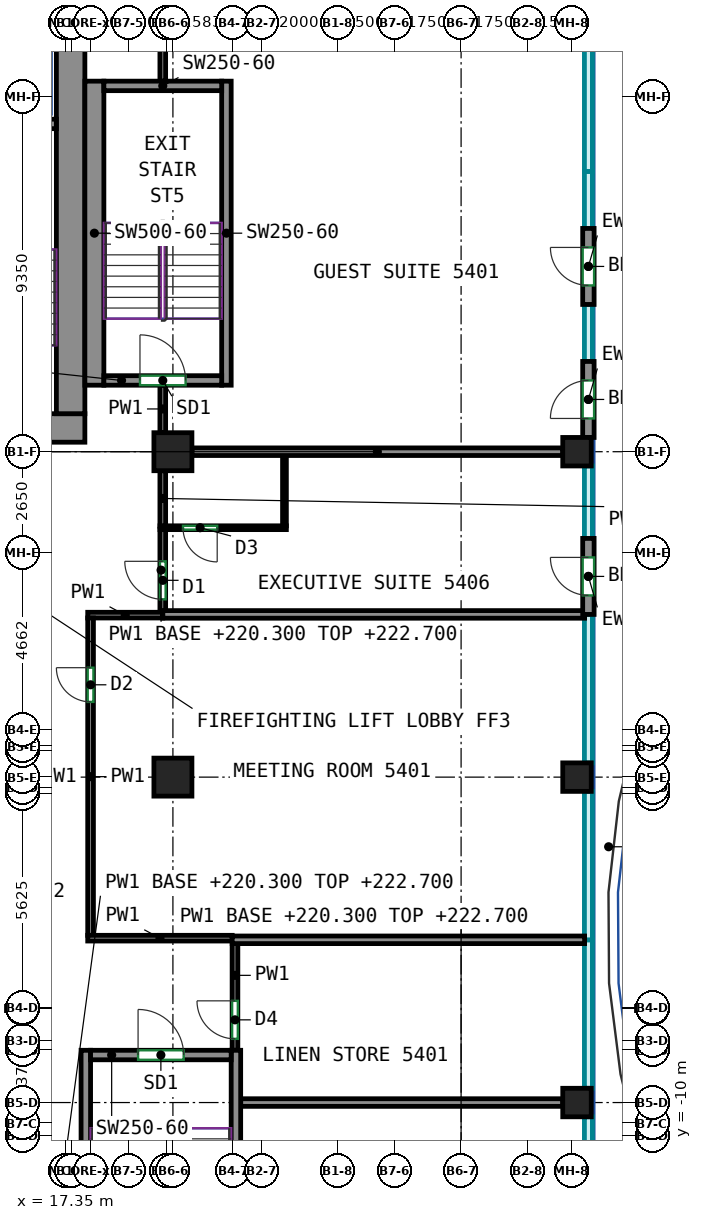
"""IFC4 building model, lengths in metres.
Left out: names, types, materials, properties, quantities, classifications, styles, units other than length and angle.
Written with IfcOpenShell. Run it as: python <this file> out.ifc"""

import sys

from ifc_helpers import new_model, si_unit, direction, frame, frame_2d, origin, origin_2d, place, context, subcontext, project, spatial, rectangle, extrude, source, transform, mapped, element, fill, save


model = new_model("IFC4")
c1 = context("Model", 3, precision=1e-05, world=origin(), true_north=direction((0.0, 1.0)))
c2 = subcontext(c1, "Body", "Model", "MODEL_VIEW")
j1 = project(units=[si_unit("LENGTHUNIT", "METRE"), si_unit("PLANEANGLEUNIT", "RADIAN")], contexts=[c1])
p1 = place(None, origin())
s1 = spatial("IfcSite", under=j1, at=p1, CompositionType="ELEMENT")
p2 = place(p1, origin())
s2 = spatial("IfcBuilding", under=s1, at=p2, CompositionType="ELEMENT")
p3 = place(p2, frame((0.0, 0.0, 220.3)))
s3 = spatial("IfcBuildingStorey", under=s2, at=p3, CompositionType="ELEMENT", Elevation=220.3)
m1 = source(origin(), c2, "Body", "SweptSolid", [
    extrude(rectangle(XDim=1.0, YDim=1.0, at=origin_2d()), origin(), (0.0, 0.0, 1.0), 3.0),
])
for number, where, z_axis, x_axis in (
    (1, (20.167, -0.562, 0.0), (0.0, 0.0, 1.0), (1.0, 0.0, 0.0)),
    (2, (20.167, 8.0, 0.0), (0.0, 0.0, 1.0), (1.0, 0.0, 0.0)),
):
    element("IfcColumn", number, at=place(p3, frame(where, z_axis=z_axis, x_axis=x_axis)), inside=s3, PredefinedType="COLUMN", context=c2, shape_type="MappedRepresentation", body=[
        mapped(m1, transform((0.0, 0.0, 0.0))),
    ])
m2 = source(origin(), c2, "Body", "SweptSolid", [
    extrude(rectangle(XDim=0.75, YDim=0.75, at=origin_2d()), origin(), (0.0, 0.0, 1.0), 3.0),
])
for number, where, z_axis, x_axis in (
    (3, (30.8, -9.125, 0.0), (0.0, 0.0, 1.0), (1.0, 0.0, 0.0)),
    (4, (30.8, -0.562, 0.0), (0.0, 0.0, 1.0), (1.0, 0.0, 0.0)),
    (5, (30.8, 8.0, 0.0), (0.0, 0.0, 1.0), (1.0, 0.0, 0.0)),
):
    element("IfcColumn", number, at=place(p3, frame(where, z_axis=z_axis, x_axis=x_axis)), inside=s3, PredefinedType="COLUMN", context=c2, shape_type="MappedRepresentation", body=[
        mapped(m2, transform((0.0, 0.0, 0.0))),
    ])
m3 = source(origin(), c2, "Body", "SweptSolid", [
    extrude(rectangle(XDim=5.38, YDim=0.75, at=frame_2d((2.69, 0.0))), origin(), (0.0, 0.0, 1.0), 3.0),
])
p4 = place(p3, frame((12.47, 8.625, 0.0), z_axis=(0.0, 0.0, 1.0), x_axis=(1.0, 0.0, 0.0)))
e6 = element("IfcWall", 6, at=p4, inside=s3, PredefinedType="SHEAR", context=c2, shape_type="MappedRepresentation", body=[
    mapped(m3, transform((0.0, 0.0, 0.0))),
])
p5 = place(p4, frame((2.18, 0.0, 0.0)))
e7 = element("IfcOpeningElement", 7, at=p5, cuts=e6, PredefinedType="OPENING", context=c2, shape_type="SweptSolid", body=[
    extrude(rectangle(XDim=1.2, YDim=2.1, at=frame_2d((0.6, 1.05))), frame((0.0, 0.385, 0.0), z_axis=(0.0, -1.0, 0.0), x_axis=(1.0, 0.0, 0.0)), (0.0, 0.0, 1.0), 0.77),
])
m4 = source(origin(), c2, "Body", "SweptSolid", [
    extrude(rectangle(XDim=12.0, YDim=0.75, at=frame_2d((6.0, 0.0))), origin(), (0.0, 0.0, 1.0), 3.0),
])
p6 = place(p3, frame((17.475, 9.0, 0.0), z_axis=(0.0, 0.0, 1.0), x_axis=(0.0, 1.0, 0.0)))
e8 = element("IfcWall", 8, at=p6, inside=s3, PredefinedType="SHEAR", context=c2, shape_type="MappedRepresentation", body=[
    mapped(m4, transform((0.0, 0.0, 0.0))),
])
m5 = source(origin(), c2, "Body", "SweptSolid", [
    extrude(rectangle(XDim=3.7, YDim=0.25, at=frame_2d((1.85, 0.0))), origin(), (0.0, 0.0, 1.0), 3.0),
])
p7 = place(p3, frame((13.4, 16.625, 0.0), z_axis=(0.0, 0.0, 1.0), x_axis=(1.0, 0.0, 0.0)))
e9 = element("IfcWall", 9, at=p7, inside=s3, PredefinedType="SHEAR", context=c2, shape_type="MappedRepresentation", body=[
    mapped(m5, transform((0.0, 0.0, 0.0))),
])
m6 = source(origin(), c2, "Body", "SweptSolid", [
    extrude(rectangle(XDim=8.0, YDim=0.25, at=frame_2d((4.0, 0.0))), origin(), (0.0, 0.0, 1.0), 3.0),
])
for number, where, z_axis, x_axis in (
    (10, (17.875, -15.75, 0.0), (0.0, 0.0, 1.0), (0.0, 1.0, 0.0)),
    (11, (21.825, -15.75, 0.0), (0.0, 0.0, 1.0), (0.0, 1.0, 0.0)),
):
    element("IfcWall", number, at=place(p3, frame(where, z_axis=z_axis, x_axis=x_axis)), inside=s3, PredefinedType="SHEAR", context=c2, shape_type="MappedRepresentation", body=[
        mapped(m6, transform((0.0, 0.0, 0.0))),
    ])
m7 = source(origin(), c2, "Body", "SweptSolid", [
    extrude(rectangle(XDim=3.7, YDim=0.25, at=frame_2d((1.85, 0.0))), origin(), (0.0, 0.0, 1.0), 3.0),
])
p8 = place(p3, frame((18.0, -7.875, 0.0), z_axis=(0.0, 0.0, 1.0), x_axis=(1.0, 0.0, 0.0)))
e12 = element("IfcWall", 12, at=p8, inside=s3, PredefinedType="SHEAR", context=c2, shape_type="MappedRepresentation", body=[
    mapped(m7, transform((0.0, 0.0, 0.0))),
])
p9 = place(p8, frame((1.25, 0.0, 0.0)))
e13 = element("IfcOpeningElement", 13, at=p9, cuts=e12, PredefinedType="OPENING", context=c2, shape_type="SweptSolid", body=[
    extrude(rectangle(XDim=1.2, YDim=2.1, at=frame_2d((0.6, 1.05))), frame((0.0, 0.135, 0.0), z_axis=(0.0, -1.0, 0.0), x_axis=(1.0, 0.0, 0.0)), (0.0, 0.0, 1.0), 0.27),
])
m8 = source(origin(), c2, "Body", "SweptSolid", [
    extrude(rectangle(XDim=8.0, YDim=0.5, at=frame_2d((4.0, 0.0))), origin(), (0.0, 0.0, 1.0), 3.0),
])
p10 = place(p3, frame((18.1, 9.75, 0.0), z_axis=(0.0, 0.0, 1.0), x_axis=(0.0, 1.0, 0.0)))
e14 = element("IfcWall", 14, at=p10, inside=s3, PredefinedType="SHEAR", context=c2, shape_type="MappedRepresentation", body=[
    mapped(m8, transform((0.0, 0.0, 0.0))),
])
p11 = place(p3, frame((21.575, 9.75, 0.0), z_axis=(0.0, 0.0, 1.0), x_axis=(0.0, 1.0, 0.0)))
e15 = element("IfcWall", 15, at=p11, inside=s3, PredefinedType="SHEAR", context=c2, shape_type="MappedRepresentation", body=[
    mapped(m6, transform((0.0, 0.0, 0.0))),
])
m9 = source(origin(), c2, "Body", "SweptSolid", [
    extrude(rectangle(XDim=3.1, YDim=0.25, at=frame_2d((1.55, 0.0))), origin(), (0.0, 0.0, 1.0), 3.0),
])
p12 = place(p3, frame((18.35, 9.875, 0.0), z_axis=(0.0, 0.0, 1.0), x_axis=(1.0, 0.0, 0.0)))
e16 = element("IfcWall", 16, at=p12, inside=s3, PredefinedType="SHEAR", context=c2, shape_type="MappedRepresentation", body=[
    mapped(m9, transform((0.0, 0.0, 0.0))),
])
p13 = place(p12, frame((0.95, 0.0, 0.0)))
e17 = element("IfcOpeningElement", 17, at=p13, cuts=e16, PredefinedType="OPENING", context=c2, shape_type="SweptSolid", body=[
    extrude(rectangle(XDim=1.2, YDim=2.1, at=frame_2d((0.6, 1.05))), frame((0.0, 0.135, 0.0), z_axis=(0.0, -1.0, 0.0), x_axis=(1.0, 0.0, 0.0)), (0.0, 0.0, 1.0), 0.27),
])
p14 = place(p3, frame((18.35, 17.625, 0.0), z_axis=(0.0, 0.0, 1.0), x_axis=(1.0, 0.0, 0.0)))
e18 = element("IfcWall", 18, at=p14, inside=s3, PredefinedType="SHEAR", context=c2, shape_type="MappedRepresentation", body=[
    mapped(m9, transform((0.0, 0.0, 0.0))),
])
m10 = source(origin(), c2, "Body", "SweptSolid", [
    extrude(rectangle(XDim=2.0, YDim=0.3, at=frame_2d((1.0, 0.0))), origin(), (0.0, 0.0, 1.0), 3.0),
])
p15 = place(p3, frame((31.1, 3.719, 0.0), z_axis=(0.0, 0.0, 1.0), x_axis=(0.0, 1.0, 0.0)))
e19 = element("IfcWall", 19, at=p15, inside=s3, PredefinedType="SOLIDWALL", context=c2, shape_type="MappedRepresentation", body=[
    mapped(m10, transform((0.0, 0.0, 0.0))),
])
p16 = place(p15, frame((0.5, 0.0, 0.0)))
e20 = element("IfcOpeningElement", 20, at=p16, cuts=e19, PredefinedType="OPENING", context=c2, shape_type="SweptSolid", body=[
    extrude(rectangle(XDim=1.0, YDim=2.1, at=frame_2d((0.5, 1.05))), frame((0.0, 0.16, 0.0), z_axis=(0.0, -1.0, 0.0), x_axis=(1.0, 0.0, 0.0)), (0.0, 0.0, 1.0), 0.32),
])
p17 = place(p3, frame((31.1, 8.375, 0.0), z_axis=(0.0, 0.0, 1.0), x_axis=(0.0, 1.0, 0.0)))
e21 = element("IfcWall", 21, at=p17, inside=s3, PredefinedType="SOLIDWALL", context=c2, shape_type="MappedRepresentation", body=[
    mapped(m10, transform((0.0, 0.0, 0.0))),
])
p18 = place(p17, frame((0.5, 0.0, 0.0)))
e22 = element("IfcOpeningElement", 22, at=p18, cuts=e21, PredefinedType="OPENING", context=c2, shape_type="SweptSolid", body=[
    extrude(rectangle(XDim=1.0, YDim=2.1, at=frame_2d((0.5, 1.05))), frame((0.0, 0.16, 0.0), z_axis=(0.0, -1.0, 0.0), x_axis=(1.0, 0.0, 0.0)), (0.0, 0.0, 1.0), 0.32),
])
p19 = place(p3, frame((31.1, 11.875, 0.0), z_axis=(0.0, 0.0, 1.0), x_axis=(0.0, 1.0, 0.0)))
e23 = element("IfcWall", 23, at=p19, inside=s3, PredefinedType="SOLIDWALL", context=c2, shape_type="MappedRepresentation", body=[
    mapped(m10, transform((0.0, 0.0, 0.0))),
])
p20 = place(p19, frame((0.5, 0.0, 0.0)))
e24 = element("IfcOpeningElement", 24, at=p20, cuts=e23, PredefinedType="OPENING", context=c2, shape_type="SweptSolid", body=[
    extrude(rectangle(XDim=1.0, YDim=2.1, at=frame_2d((0.5, 1.05))), frame((0.0, 0.16, 0.0), z_axis=(0.0, -1.0, 0.0), x_axis=(1.0, 0.0, 0.0)), (0.0, 0.0, 1.0), 0.32),
])
p21 = place(p3, frame((19.9, 3.809, 0.0), z_axis=(0.0, 0.0, 1.0), x_axis=(0.0, 1.0, 0.0)))
e25 = element("IfcWall", 25, at=p21, inside=s3, PredefinedType="PARTITIONING", context=c2, shape_type="SweptSolid", body=[
    extrude(rectangle(XDim=2.151, YDim=0.15, at=frame_2d((1.075, 0.0))), origin(), (0.0, 0.0, 1.0), 2.4),
])
p22 = place(p21, frame((0.307, 0.0, 0.0)))
e26 = element("IfcOpeningElement", 26, at=p22, cuts=e25, PredefinedType="OPENING", context=c2, shape_type="SweptSolid", body=[
    extrude(rectangle(XDim=1.0, YDim=2.1, at=frame_2d((0.5, 1.05))), frame((0.0, 0.085, 0.0), z_axis=(0.0, -1.0, 0.0), x_axis=(1.0, 0.0, 0.0)), (0.0, 0.0, 1.0), 0.17),
])
p23 = place(p3, frame((19.9, 6.04, 0.0), z_axis=(0.0, 0.0, 1.0), x_axis=(0.0, 1.0, 0.0)))
e27 = element("IfcWall", 27, at=p23, inside=s3, PredefinedType="PARTITIONING", context=c2, shape_type="SweptSolid", body=[
    extrude(rectangle(XDim=1.46, YDim=0.15, at=frame_2d((0.73, 0.0))), origin(), (0.0, 0.0, 1.0), 2.4),
])
p24 = place(p3, frame((19.9, 17.75, 0.0), z_axis=(0.0, 0.0, 1.0), x_axis=(0.0, 1.0, 0.0)))
e28 = element("IfcWall", 28, at=p24, inside=s3, PredefinedType="PARTITIONING", context=c2, shape_type="SweptSolid", body=[
    extrude(rectangle(XDim=2.21, YDim=0.15, at=frame_2d((1.105, 0.0))), origin(), (0.0, 0.0, 1.0), 3.0),
])
p25 = place(p3, frame((19.9, 8.5, 0.0), z_axis=(0.0, 0.0, 1.0), x_axis=(0.0, 1.0, 0.0)))
e29 = element("IfcWall", 29, at=p25, inside=s3, PredefinedType="PARTITIONING", context=c2, shape_type="SweptSolid", body=[
    extrude(rectangle(XDim=1.25, YDim=0.15, at=frame_2d((0.625, 0.0))), origin(), (0.0, 0.0, 1.0), 3.0),
])
p26 = place(p3, frame((17.925, 3.7, 0.0), z_axis=(0.0, 0.0, 1.0), x_axis=(1.0, 0.0, 0.0)))
e30 = element("IfcWall", 30, at=p26, inside=s3, PredefinedType="PARTITIONING", context=c2, shape_type="SweptSolid", body=[
    extrude(rectangle(XDim=1.975, YDim=0.15, at=frame_2d((0.987, 0.0))), origin(), (0.0, 0.0, 1.0), 3.0),
])
p27 = place(p3, frame((18.0, -4.725, 0.0), z_axis=(0.0, 0.0, 1.0), x_axis=(0.0, 1.0, 0.0)))
e31 = element("IfcWall", 31, at=p27, inside=s3, PredefinedType="PARTITIONING", context=c2, shape_type="SweptSolid", body=[
    extrude(rectangle(XDim=8.35, YDim=0.15, at=frame_2d((4.175, 0.0))), origin(), (0.0, 0.0, 1.0), 3.0),
])
p28 = place(p27, frame((6.142, 0.0, 0.0)))
e32 = element("IfcOpeningElement", 32, at=p28, cuts=e31, PredefinedType="OPENING", context=c2, shape_type="SweptSolid", body=[
    extrude(rectangle(XDim=0.9, YDim=2.1, at=frame_2d((0.45, 1.05))), frame((0.0, 0.085, 0.0), z_axis=(0.0, -1.0, 0.0), x_axis=(1.0, 0.0, 0.0)), (0.0, 0.0, 1.0), 0.17),
])
p29 = place(p3, frame((17.925, -4.8, 0.0), z_axis=(0.0, 0.0, 1.0), x_axis=(1.0, 0.0, 0.0)))
e33 = element("IfcWall", 33, at=p29, inside=s3, PredefinedType="PARTITIONING", context=c2, shape_type="SweptSolid", body=[
    extrude(rectangle(XDim=3.802, YDim=0.15, at=frame_2d((1.901, 0.0))), origin(), (0.0, 0.0, 1.0), 3.0),
])
p30 = place(p3, frame((21.8, -7.75, 0.0), z_axis=(0.0, 0.0, 1.0), x_axis=(0.0, 1.0, 0.0)))
e34 = element("IfcWall", 34, at=p30, inside=s3, PredefinedType="PARTITIONING", context=c2, shape_type="SweptSolid", body=[
    extrude(rectangle(XDim=2.817, YDim=0.15, at=frame_2d((1.408, 0.0))), origin(), (0.0, 0.0, 1.0), 3.0),
])
p31 = place(p30, frame((0.301, 0.0, 0.0)))
e35 = element("IfcOpeningElement", 35, at=p31, cuts=e34, PredefinedType="OPENING", context=c2, shape_type="SweptSolid", body=[
    extrude(rectangle(XDim=1.0, YDim=2.1, at=frame_2d((0.5, 1.05))), frame((0.0, 0.085, 0.0), z_axis=(0.0, -1.0, 0.0), x_axis=(1.0, 0.0, 0.0)), (0.0, 0.0, 1.0), 0.17),
])
p32 = place(p3, frame((23.152, 6.0, 0.0), z_axis=(0.0, 0.0, 1.0), x_axis=(-1.0, 0.0, 0.0)))
e36 = element("IfcWall", 36, at=p32, inside=s3, PredefinedType="PARTITIONING", context=c2, shape_type="SweptSolid", body=[
    extrude(rectangle(XDim=3.325, YDim=0.1, at=frame_2d((1.663, 0.0))), origin(), (0.0, 0.0, 1.0), 3.0),
])
p33 = place(p32, frame((1.82, 0.0, 0.0)))
e37 = element("IfcOpeningElement", 37, at=p33, cuts=e36, PredefinedType="OPENING", context=c2, shape_type="SweptSolid", body=[
    extrude(rectangle(XDim=0.9, YDim=2.1, at=frame_2d((0.45, 1.05))), frame((0.0, 0.06, 0.0), z_axis=(0.0, -1.0, 0.0), x_axis=(1.0, 0.0, 0.0)), (0.0, 0.0, 1.0), 0.12),
])
p34 = place(p3, frame((23.102, 6.05, 0.0), z_axis=(0.0, 0.0, 1.0), x_axis=(0.0, 1.0, 0.0)))
e38 = element("IfcWall", 38, at=p34, inside=s3, PredefinedType="PARTITIONING", context=c2, shape_type="SweptSolid", body=[
    extrude(rectangle(XDim=1.85, YDim=0.1, at=frame_2d((0.925, 0.0))), origin(), (0.0, 0.0, 1.0), 3.0),
])
p35 = place(p3, frame((19.902, 3.719, 0.0), z_axis=(0.0, 0.0, 1.0), x_axis=(1.0, 0.0, 0.0)))
e39 = element("IfcWall", 39, at=p35, inside=s3, PredefinedType="PARTITIONING", context=c2, shape_type="SweptSolid", body=[
    extrude(rectangle(XDim=11.098, YDim=0.2, at=frame_2d((5.549, 0.0))), origin(), (0.0, 0.0, 1.0), 3.0),
])
p36 = place(p3, frame((20.667, 8.0, 0.0), z_axis=(0.0, 0.0, 1.0), x_axis=(1.0, 0.0, 0.0)))
e40 = element("IfcWall", 40, at=p36, inside=s3, PredefinedType="PARTITIONING", context=c2, shape_type="SweptSolid", body=[
    extrude(rectangle(XDim=9.758, YDim=0.2, at=frame_2d((4.879, 0.0))), origin(), (0.0, 0.0, 1.0), 2.4),
])
p37 = place(p3, frame((21.727, -4.843, 0.0), z_axis=(0.0, 0.0, 1.0), x_axis=(1.0, 0.0, 0.0)))
e41 = element("IfcWall", 41, at=p37, inside=s3, PredefinedType="PARTITIONING", context=c2, shape_type="SweptSolid", body=[
    extrude(rectangle(XDim=9.273, YDim=0.2, at=frame_2d((4.636, 0.0))), origin(), (0.0, 0.0, 1.0), 3.0),
])
p38 = place(p3, frame((21.95, -9.125, 0.0), z_axis=(0.0, 0.0, 1.0), x_axis=(1.0, 0.0, 0.0)))
e42 = element("IfcWall", 42, at=p38, inside=s3, PredefinedType="PARTITIONING", context=c2, shape_type="SweptSolid", body=[
    extrude(rectangle(XDim=8.475, YDim=0.2, at=frame_2d((4.238, 0.0))), origin(), (0.0, 0.0, 1.0), 3.0),
])
p39 = place(p16, origin())
e43 = element("IfcDoor", 43, at=p39, inside=s3, OperationType="SINGLE_SWING_RIGHT", PredefinedType="DOOR", context=c2, shape_type="SweptSolid", body=[
    extrude(rectangle(XDim=1.0, YDim=2.1, at=frame_2d((0.5, 1.05))), frame((0.0, 0.025, 0.0), z_axis=(0.0, -1.0, 0.0), x_axis=(1.0, 0.0, 0.0)), (0.0, 0.0, 1.0), 0.05),
])
fill(e20, e43)
p40 = place(p18, origin())
e44 = element("IfcDoor", 44, at=p40, inside=s3, OperationType="SINGLE_SWING_LEFT", PredefinedType="DOOR", context=c2, shape_type="SweptSolid", body=[
    extrude(rectangle(XDim=1.0, YDim=2.1, at=frame_2d((0.5, 1.05))), frame((0.0, 0.025, 0.0), z_axis=(0.0, -1.0, 0.0), x_axis=(1.0, 0.0, 0.0)), (0.0, 0.0, 1.0), 0.05),
])
fill(e22, e44)
p41 = place(p20, origin())
e45 = element("IfcDoor", 45, at=p41, inside=s3, OperationType="SINGLE_SWING_RIGHT", PredefinedType="DOOR", context=c2, shape_type="SweptSolid", body=[
    extrude(rectangle(XDim=1.0, YDim=2.1, at=frame_2d((0.5, 1.05))), frame((0.0, 0.025, 0.0), z_axis=(0.0, -1.0, 0.0), x_axis=(1.0, 0.0, 0.0)), (0.0, 0.0, 1.0), 0.05),
])
fill(e24, e45)
p42 = place(p9, origin())
e46 = element("IfcDoor", 46, at=p42, inside=s3, OperationType="DOUBLE_DOOR_SINGLE_SWING", PredefinedType="DOOR", context=c2, shape_type="SweptSolid", body=[
    extrude(rectangle(XDim=1.2, YDim=2.1, at=frame_2d((0.6, 1.05))), frame((0.0, 0.025, 0.0), z_axis=(0.0, -1.0, 0.0), x_axis=(1.0, 0.0, 0.0)), (0.0, 0.0, 1.0), 0.05),
])
fill(e13, e46)
p43 = place(p13, origin())
e47 = element("IfcDoor", 47, at=p43, inside=s3, OperationType="DOUBLE_DOOR_SINGLE_SWING", PredefinedType="DOOR", context=c2, shape_type="SweptSolid", body=[
    extrude(rectangle(XDim=1.2, YDim=2.1, at=frame_2d((0.6, 1.05))), frame((0.0, 0.025, 0.0), z_axis=(0.0, -1.0, 0.0), x_axis=(1.0, 0.0, 0.0)), (0.0, 0.0, 1.0), 0.05),
])
fill(e17, e47)
p44 = place(p31, origin())
e48 = element("IfcDoor", 48, at=p44, inside=s3, OperationType="SINGLE_SWING_RIGHT", PredefinedType="DOOR", context=c2, shape_type="SweptSolid", body=[
    extrude(rectangle(XDim=1.0, YDim=2.1, at=frame_2d((0.5, 1.05))), frame((0.0, 0.025, 0.0), z_axis=(0.0, -1.0, 0.0), x_axis=(1.0, 0.0, 0.0)), (0.0, 0.0, 1.0), 0.05),
])
fill(e35, e48)
p45 = place(p28, origin())
e49 = element("IfcDoor", 49, at=p45, inside=s3, OperationType="SINGLE_SWING_RIGHT", PredefinedType="DOOR", context=c2, shape_type="SweptSolid", body=[
    extrude(rectangle(XDim=0.9, YDim=2.1, at=frame_2d((0.45, 1.05))), frame((0.0, 0.025, 0.0), z_axis=(0.0, -1.0, 0.0), x_axis=(1.0, 0.0, 0.0)), (0.0, 0.0, 1.0), 0.05),
])
fill(e32, e49)
p46 = place(p22, origin())
e50 = element("IfcDoor", 50, at=p46, inside=s3, OperationType="SINGLE_SWING_RIGHT", PredefinedType="DOOR", context=c2, shape_type="SweptSolid", body=[
    extrude(rectangle(XDim=1.0, YDim=2.1, at=frame_2d((0.5, 1.05))), frame((0.0, 0.025, 0.0), z_axis=(0.0, -1.0, 0.0), x_axis=(1.0, 0.0, 0.0)), (0.0, 0.0, 1.0), 0.05),
])
fill(e26, e50)
p47 = place(p33, origin())
e51 = element("IfcDoor", 51, at=p47, inside=s3, OperationType="SINGLE_SWING_LEFT", PredefinedType="DOOR", context=c2, shape_type="SweptSolid", body=[
    extrude(rectangle(XDim=0.9, YDim=2.1, at=frame_2d((0.45, 1.05))), frame((0.0, 0.025, 0.0), z_axis=(0.0, -1.0, 0.0), x_axis=(1.0, 0.0, 0.0)), (0.0, 0.0, 1.0), 0.05),
])
fill(e37, e51)
save(model, sys.argv[1])
